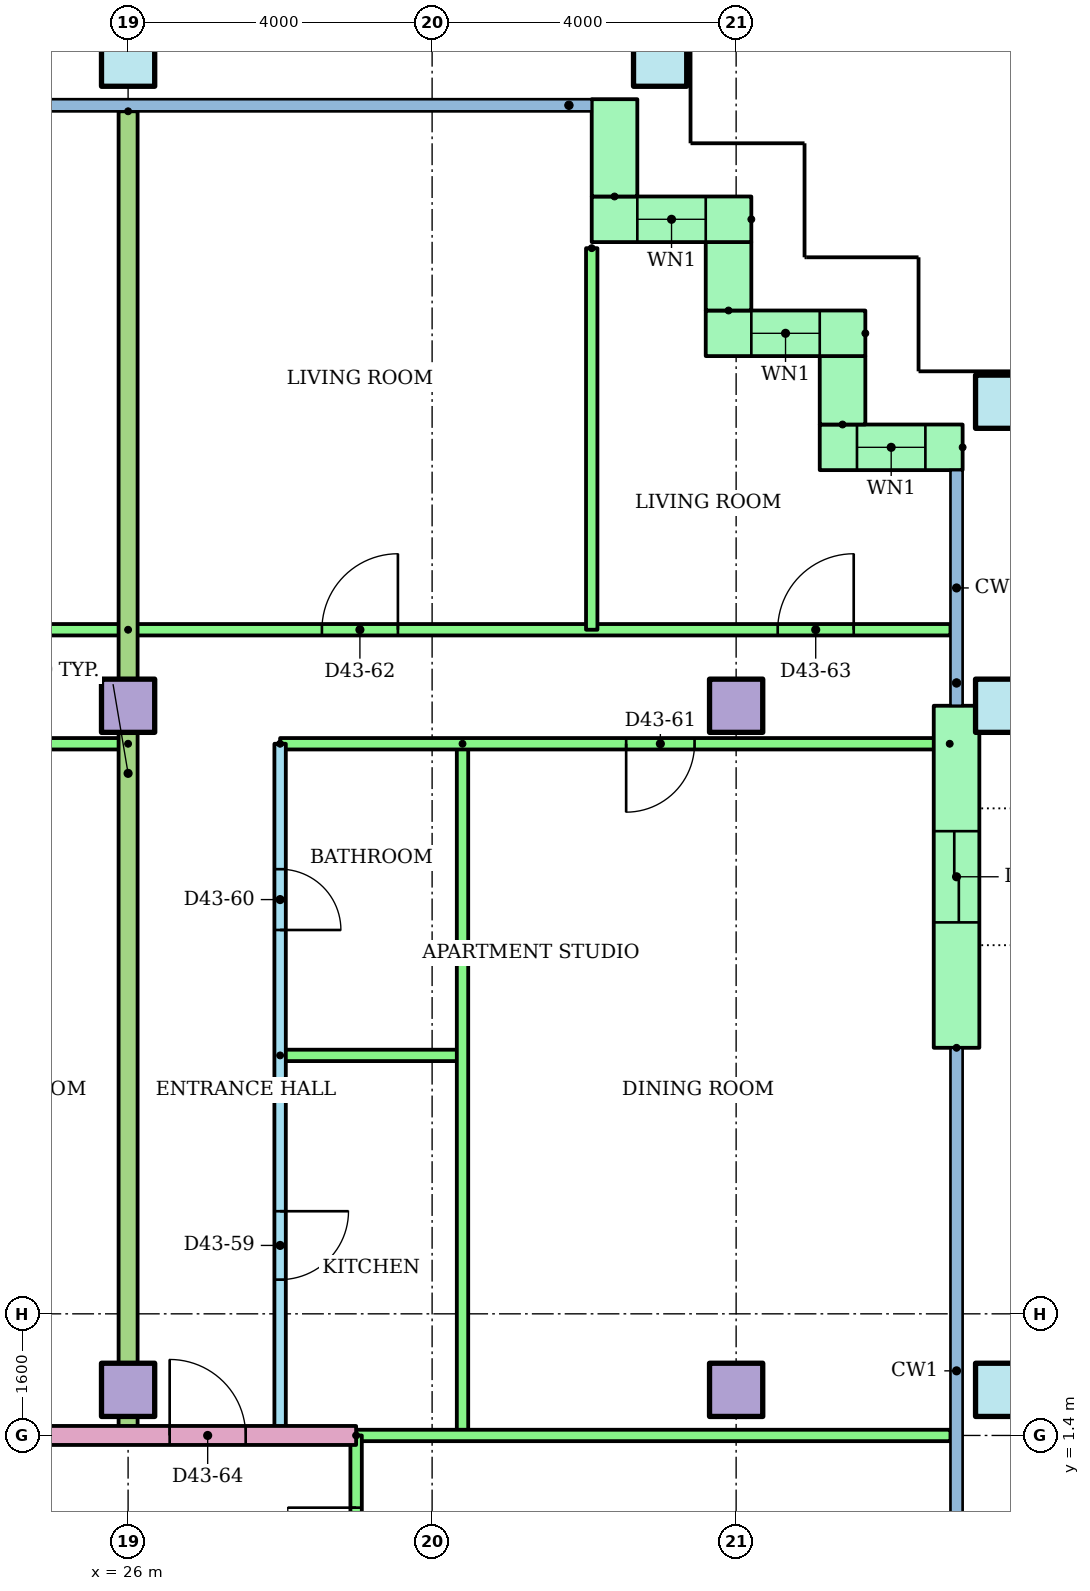
"""IFC4 building model, lengths in metres.
Left out: names, types, materials, properties, quantities, classifications, styles, units other than length and angle.
Written with IfcOpenShell. Run it as: python <this file> out.ifc"""

import sys

from ifc_helpers import new_model, si_unit, direction, frame, frame_2d, origin, origin_2d, place, context, subcontext, project, spatial, rectangle, hollow_rectangle, extrude, element, fill, save


model = new_model("IFC4")
c1 = context("Model", 3, precision=1e-05, world=origin(), true_north=direction((0.0, 1.0)))
c2 = subcontext(c1, "Body", "Model", "MODEL_VIEW")
j1 = project(units=[si_unit("LENGTHUNIT", "METRE"), si_unit("PLANEANGLEUNIT", "RADIAN")], contexts=[c1])
p1 = place(None, origin())
s1 = spatial("IfcSite", under=j1, at=p1, CompositionType="ELEMENT")
p2 = place(p1, origin())
s2 = spatial("IfcBuilding", under=s1, at=p2, CompositionType="ELEMENT")
p3 = place(p2, frame((0.0, 0.0, 168.5)))
s3 = spatial("IfcBuildingStorey", under=s2, at=p3, CompositionType="ELEMENT", Elevation=168.5)
for number, where in (
    (1, (26.0, 2.0, 0.0)),
    (2, (34.0, 2.0, 0.0)),
):
    element("IfcColumn", number, at=place(p3, frame(where)), inside=s3, PredefinedType="COLUMN", context=c2, shape_type="SweptSolid", body=[
        extrude(rectangle(XDim=0.7, YDim=0.7, at=origin_2d()), origin(), (0.0, 0.0, 1.0), 3.2),
    ])
p4 = place(p3, frame((37.5, 2.0, 0.0)))
e3 = element("IfcColumn", 3, at=p4, inside=s3, PredefinedType="COLUMN", context=c2, shape_type="SweptSolid", body=[
    extrude(hollow_rectangle(XDim=0.7, YDim=0.7, WallThickness=0.036, at=origin_2d()), origin(), (0.0, 0.0, 1.0), 3.2),
])
for number, where in (
    (4, (26.0, 11.0, 0.0)),
    (5, (34.0, 11.0, 0.0)),
):
    element("IfcColumn", number, at=place(p3, frame(where)), inside=s3, PredefinedType="COLUMN", context=c2, shape_type="SweptSolid", body=[
        extrude(rectangle(XDim=0.7, YDim=0.7, at=origin_2d()), origin(), (0.0, 0.0, 1.0), 3.2),
    ])
for number, where in (
    (6, (37.5, 11.0, 0.0)),
    (7, (37.5, 15.0, 0.0)),
    (8, (26.0, 19.5, 0.0)),
    (9, (33.0, 19.5, 0.0)),
):
    element("IfcColumn", number, at=place(p3, frame(where)), inside=s3, PredefinedType="COLUMN", context=c2, shape_type="SweptSolid", body=[
        extrude(hollow_rectangle(XDim=0.7, YDim=0.7, WallThickness=0.036, at=origin_2d()), origin(), (0.0, 0.0, 1.0), 3.2),
    ])
p5 = place(p3, frame((36.98, 14.4, 0.0), z_axis=(0.0, 0.0, 1.0), x_axis=(-1.0, 0.0, 0.0)))
e10 = element("IfcWall", 10, at=p5, inside=s3, PredefinedType="STANDARD", context=c2, shape_type="SweptSolid", body=[
    extrude(rectangle(XDim=1.88, YDim=0.6, at=frame_2d((0.94, 0.0))), origin(), (0.0, 0.0, 1.0), 2.92),
])
p6 = place(p5, frame((0.49, 0.0, 0.9)))
e11 = element("IfcOpeningElement", 11, at=p6, cuts=e10, PredefinedType="OPENING", context=c2, shape_type="SweptSolid", body=[
    extrude(rectangle(XDim=0.9, YDim=1.5, at=frame_2d((0.45, 0.75))), frame((0.0, 0.31, 0.0), z_axis=(0.0, -1.0, 0.0), x_axis=(1.0, 0.0, 0.0)), (0.0, 0.0, 1.0), 0.62),
])
p7 = place(p3, frame((35.4, 14.7, 0.0), z_axis=(0.0, 0.0, 1.0), x_axis=(0.0, 1.0, 0.0)))
e12 = element("IfcWall", 12, at=p7, inside=s3, PredefinedType="STANDARD", context=c2, shape_type="SweptSolid", body=[
    extrude(rectangle(XDim=0.9, YDim=0.6, at=frame_2d((0.45, 0.0))), origin(), (0.0, 0.0, 1.0), 2.92),
])
p8 = place(p3, frame((35.7, 15.9, 0.0), z_axis=(0.0, 0.0, 1.0), x_axis=(-1.0, 0.0, 0.0)))
e13 = element("IfcWall", 13, at=p8, inside=s3, PredefinedType="STANDARD", context=c2, shape_type="SweptSolid", body=[
    extrude(rectangle(XDim=2.1, YDim=0.6, at=frame_2d((1.05, 0.0))), origin(), (0.0, 0.0, 1.0), 2.92),
])
p9 = place(p8, frame((0.6, 0.0, 0.9)))
e14 = element("IfcOpeningElement", 14, at=p9, cuts=e13, PredefinedType="OPENING", context=c2, shape_type="SweptSolid", body=[
    extrude(rectangle(XDim=0.9, YDim=1.5, at=frame_2d((0.45, 0.75))), frame((0.0, 0.31, 0.0), z_axis=(0.0, -1.0, 0.0), x_axis=(1.0, 0.0, 0.0)), (0.0, 0.0, 1.0), 0.62),
])
p10 = place(p3, frame((33.9, 16.2, 0.0), z_axis=(0.0, 0.0, 1.0), x_axis=(0.0, 1.0, 0.0)))
e15 = element("IfcWall", 15, at=p10, inside=s3, PredefinedType="STANDARD", context=c2, shape_type="SweptSolid", body=[
    extrude(rectangle(XDim=0.9, YDim=0.6, at=frame_2d((0.45, 0.0))), origin(), (0.0, 0.0, 1.0), 2.92),
])
p11 = place(p3, frame((34.2, 17.4, 0.0), z_axis=(0.0, 0.0, 1.0), x_axis=(-1.0, 0.0, 0.0)))
e16 = element("IfcWall", 16, at=p11, inside=s3, PredefinedType="STANDARD", context=c2, shape_type="SweptSolid", body=[
    extrude(rectangle(XDim=2.1, YDim=0.6, at=frame_2d((1.05, 0.0))), origin(), (0.0, 0.0, 1.0), 2.92),
])
p12 = place(p11, frame((0.6, 0.0, 0.9)))
e17 = element("IfcOpeningElement", 17, at=p12, cuts=e16, PredefinedType="OPENING", context=c2, shape_type="SweptSolid", body=[
    extrude(rectangle(XDim=0.9, YDim=1.5, at=frame_2d((0.45, 0.75))), frame((0.0, 0.31, 0.0), z_axis=(0.0, -1.0, 0.0), x_axis=(1.0, 0.0, 0.0)), (0.0, 0.0, 1.0), 0.62),
])
p13 = place(p3, frame((32.4, 17.7, 0.0), z_axis=(0.0, 0.0, 1.0), x_axis=(0.0, 1.0, 0.0)))
e18 = element("IfcWall", 18, at=p13, inside=s3, PredefinedType="STANDARD", context=c2, shape_type="SweptSolid", body=[
    extrude(rectangle(XDim=1.28, YDim=0.6, at=frame_2d((0.64, 0.0))), origin(), (0.0, 0.0, 1.0), 2.92),
])
p14 = place(p3, frame((36.9, 6.5, 0.0), z_axis=(0.0, 0.0, 1.0), x_axis=(0.0, 1.0, 0.0)))
e19 = element("IfcWall", 19, at=p14, inside=s3, PredefinedType="STANDARD", context=c2, shape_type="SweptSolid", body=[
    extrude(rectangle(XDim=4.5, YDim=0.6, at=frame_2d((2.25, 0.0))), origin(), (0.0, 0.0, 1.0), 2.92),
])
p15 = place(p14, frame((1.65, 0.0, 0.0)))
e20 = element("IfcOpeningElement", 20, at=p15, cuts=e19, PredefinedType="OPENING", context=c2, shape_type="SweptSolid", body=[
    extrude(rectangle(XDim=1.2, YDim=2.1, at=frame_2d((0.6, 1.05))), frame((0.0, 0.31, 0.0), z_axis=(0.0, -1.0, 0.0), x_axis=(1.0, 0.0, 0.0)), (0.0, 0.0, 1.0), 0.62),
])
p16 = place(p3, frame((26.0, 10.5, 0.0), z_axis=(0.0, 0.0, 1.0), x_axis=(-1.0, 0.0, 0.0)))
e21 = element("IfcWall", 21, at=p16, inside=s3, PredefinedType="PARTITIONING", context=c2, shape_type="SweptSolid", body=[
    extrude(rectangle(XDim=10.0, YDim=0.15, at=frame_2d((5.0, 0.0))), origin(), (0.0, 0.0, 1.0), 2.4),
])
p17 = place(p16, frame((4.9, 0.0, 0.0)))
e22 = element("IfcOpeningElement", 22, at=p17, cuts=e21, PredefinedType="OPENING", context=c2, shape_type="SweptSolid", body=[
    extrude(rectangle(XDim=0.9, YDim=2.1, at=frame_2d((0.45, 1.05))), frame((0.0, 0.085, 0.0), z_axis=(0.0, -1.0, 0.0), x_axis=(1.0, 0.0, 0.0)), (0.0, 0.0, 1.0), 0.17),
])
p18 = place(p16, frame((1.1, 0.0, 0.0)))
e23 = element("IfcOpeningElement", 23, at=p18, cuts=e21, PredefinedType="OPENING", context=c2, shape_type="SweptSolid", body=[
    extrude(rectangle(XDim=0.9, YDim=2.1, at=frame_2d((0.45, 1.05))), frame((0.0, 0.085, 0.0), z_axis=(0.0, -1.0, 0.0), x_axis=(1.0, 0.0, 0.0)), (0.0, 0.0, 1.0), 0.17),
])
p19 = place(p3, frame((14.0, 12.0, 0.0)))
e24 = element("IfcWall", 24, at=p19, inside=s3, PredefinedType="PARTITIONING", context=c2, shape_type="SweptSolid", body=[
    extrude(rectangle(XDim=12.0, YDim=0.15, at=frame_2d((6.0, 0.0))), origin(), (0.0, 0.0, 1.0), 2.4),
])
p20 = place(p19, frame((1.5, 0.0, 0.0)))
e25 = element("IfcOpeningElement", 25, at=p20, cuts=e24, PredefinedType="OPENING", context=c2, shape_type="SweptSolid", body=[
    extrude(rectangle(XDim=1.0, YDim=2.1, at=frame_2d((0.5, 1.05))), frame((0.0, 0.085, 0.0), z_axis=(0.0, -1.0, 0.0), x_axis=(1.0, 0.0, 0.0)), (0.0, 0.0, 1.0), 0.17),
])
p21 = place(p19, frame((7.55, 0.0, 0.0)))
e26 = element("IfcOpeningElement", 26, at=p21, cuts=e24, PredefinedType="OPENING", context=c2, shape_type="SweptSolid", body=[
    extrude(rectangle(XDim=0.9, YDim=2.1, at=frame_2d((0.45, 1.05))), frame((0.0, 0.085, 0.0), z_axis=(0.0, -1.0, 0.0), x_axis=(1.0, 0.0, 0.0)), (0.0, 0.0, 1.0), 0.17),
])
p22 = place(p3, frame((28.0, 10.5, 0.0), z_axis=(0.0, 0.0, 1.0), x_axis=(0.0, -1.0, 0.0)))
e27 = element("IfcWall", 27, at=p22, inside=s3, PredefinedType="PARTITIONING", context=c2, shape_type="SweptSolid", body=[
    extrude(rectangle(XDim=9.1, YDim=0.15, at=frame_2d((4.55, 0.0))), origin(), (0.0, 0.0, 1.0), 2.4),
])
p23 = place(p22, frame((6.15, 0.0, 0.0)))
e28 = element("IfcOpeningElement", 28, at=p23, cuts=e27, PredefinedType="OPENING", context=c2, shape_type="SweptSolid", body=[
    extrude(rectangle(XDim=0.9, YDim=2.1, at=frame_2d((0.45, 1.05))), frame((0.0, 0.085, 0.0), z_axis=(0.0, -1.0, 0.0), x_axis=(1.0, 0.0, 0.0)), (0.0, 0.0, 1.0), 0.17),
])
p24 = place(p22, frame((1.65, 0.0, 0.0)))
e29 = element("IfcOpeningElement", 29, at=p24, cuts=e27, PredefinedType="OPENING", context=c2, shape_type="SweptSolid", body=[
    extrude(rectangle(XDim=0.8, YDim=2.1, at=frame_2d((0.4, 1.05))), frame((0.0, 0.085, 0.0), z_axis=(0.0, -1.0, 0.0), x_axis=(1.0, 0.0, 0.0)), (0.0, 0.0, 1.0), 0.17),
])
p25 = place(p3, frame((28.0, 6.4, 0.0)))
e30 = element("IfcWall", 30, at=p25, inside=s3, PredefinedType="PARTITIONING", context=c2, shape_type="SweptSolid", body=[
    extrude(rectangle(XDim=2.4, YDim=0.15, at=frame_2d((1.2, 0.0))), origin(), (0.0, 0.0, 1.0), 2.4),
])
p26 = place(p3, frame((30.4, 10.5, 0.0), z_axis=(0.0, 0.0, 1.0), x_axis=(0.0, -1.0, 0.0)))
e31 = element("IfcWall", 31, at=p26, inside=s3, PredefinedType="PARTITIONING", context=c2, shape_type="SweptSolid", body=[
    extrude(rectangle(XDim=9.1, YDim=0.15, at=frame_2d((4.55, 0.0))), origin(), (0.0, 0.0, 1.0), 2.4),
])
p27 = place(p3, frame((36.81, 10.5, 0.0), z_axis=(0.0, 0.0, 1.0), x_axis=(-1.0, 0.0, 0.0)))
e32 = element("IfcWall", 32, at=p27, inside=s3, PredefinedType="PARTITIONING", context=c2, shape_type="SweptSolid", body=[
    extrude(rectangle(XDim=8.81, YDim=0.15, at=frame_2d((4.405, 0.0))), origin(), (0.0, 0.0, 1.0), 2.4),
])
p28 = place(p27, frame((3.357, 0.0, 0.0)))
e33 = element("IfcOpeningElement", 33, at=p28, cuts=e32, PredefinedType="OPENING", context=c2, shape_type="SweptSolid", body=[
    extrude(rectangle(XDim=0.9, YDim=2.1, at=frame_2d((0.45, 1.05))), frame((0.0, 0.085, 0.0), z_axis=(0.0, -1.0, 0.0), x_axis=(1.0, 0.0, 0.0)), (0.0, 0.0, 1.0), 0.17),
])
p29 = place(p3, frame((26.0, 12.0, 0.0)))
e34 = element("IfcWall", 34, at=p29, inside=s3, PredefinedType="PARTITIONING", context=c2, shape_type="SweptSolid", body=[
    extrude(rectangle(XDim=10.82, YDim=0.15, at=frame_2d((5.41, 0.0))), origin(), (0.0, 0.0, 1.0), 2.4),
])
p30 = place(p29, frame((2.55, 0.0, 0.0)))
e35 = element("IfcOpeningElement", 35, at=p30, cuts=e34, PredefinedType="OPENING", context=c2, shape_type="SweptSolid", body=[
    extrude(rectangle(XDim=1.0, YDim=2.1, at=frame_2d((0.5, 1.05))), frame((0.0, 0.085, 0.0), z_axis=(0.0, -1.0, 0.0), x_axis=(1.0, 0.0, 0.0)), (0.0, 0.0, 1.0), 0.17),
])
p31 = place(p29, frame((8.547, 0.0, 0.0)))
e36 = element("IfcOpeningElement", 36, at=p31, cuts=e34, PredefinedType="OPENING", context=c2, shape_type="SweptSolid", body=[
    extrude(rectangle(XDim=1.0, YDim=2.1, at=frame_2d((0.5, 1.05))), frame((0.0, 0.085, 0.0), z_axis=(0.0, -1.0, 0.0), x_axis=(1.0, 0.0, 0.0)), (0.0, 0.0, 1.0), 0.17),
])
p32 = place(p3, frame((32.1, 17.02, 0.0), z_axis=(0.0, 0.0, 1.0), x_axis=(0.0, -1.0, 0.0)))
e37 = element("IfcWall", 37, at=p32, inside=s3, PredefinedType="PARTITIONING", context=c2, shape_type="SweptSolid", body=[
    extrude(rectangle(XDim=5.02, YDim=0.15, at=frame_2d((2.51, 0.0))), origin(), (0.0, 0.0, 1.0), 2.4),
])
p33 = place(p3, frame((26.0, 18.821, 0.0), z_axis=(0.0, 0.0, 1.0), x_axis=(0.0, -1.0, 0.0)))
e38 = element("IfcWall", 38, at=p33, inside=s3, PredefinedType="PARTITIONING", context=c2, shape_type="SweptSolid", body=[
    extrude(rectangle(XDim=17.421, YDim=0.25, at=frame_2d((8.71, 0.0))), origin(), (0.0, 0.0, 1.0), 2.4),
])
p34 = place(p3, frame((14.0, 1.4, 0.0)))
e39 = element("IfcWall", 39, at=p34, inside=s3, PredefinedType="PARTITIONING", context=c2, shape_type="SweptSolid", body=[
    extrude(rectangle(XDim=15.0, YDim=0.25, at=frame_2d((7.5, 0.0))), origin(), (0.0, 0.0, 1.0), 2.4),
])
p35 = place(p34, frame((0.5, 0.0, 0.0)))
e40 = element("IfcOpeningElement", 40, at=p35, cuts=e39, PredefinedType="OPENING", context=c2, shape_type="SweptSolid", body=[
    extrude(rectangle(XDim=1.0, YDim=2.1, at=frame_2d((0.5, 1.05))), frame((0.0, 0.135, 0.0), z_axis=(0.0, -1.0, 0.0), x_axis=(1.0, 0.0, 0.0)), (0.0, 0.0, 1.0), 0.27),
])
p36 = place(p34, frame((12.547, 0.0, 0.0)))
e41 = element("IfcOpeningElement", 41, at=p36, cuts=e39, PredefinedType="OPENING", context=c2, shape_type="SweptSolid", body=[
    extrude(rectangle(XDim=1.0, YDim=2.1, at=frame_2d((0.5, 1.05))), frame((0.0, 0.135, 0.0), z_axis=(0.0, -1.0, 0.0), x_axis=(1.0, 0.0, 0.0)), (0.0, 0.0, 1.0), 0.27),
])
p37 = place(p3, frame((29.0, 1.4, 0.0)))
e42 = element("IfcWall", 42, at=p37, inside=s3, PredefinedType="PARTITIONING", context=c2, shape_type="SweptSolid", body=[
    extrude(rectangle(XDim=7.82, YDim=0.15, at=frame_2d((3.91, 0.0))), origin(), (0.0, 0.0, 1.0), 2.4),
])
p38 = place(p3, frame((29.0, -1.4, 0.0), z_axis=(0.0, 0.0, 1.0), x_axis=(0.0, 1.0, 0.0)))
e43 = element("IfcWall", 43, at=p38, inside=s3, PredefinedType="PARTITIONING", context=c2, shape_type="SweptSolid", body=[
    extrude(rectangle(XDim=2.8, YDim=0.15, at=frame_2d((1.4, 0.0))), origin(), (0.0, 0.0, 1.0), 2.4),
])
p39 = place(p38, frame((0.95, 0.0, 0.0)))
e44 = element("IfcOpeningElement", 44, at=p39, cuts=e43, PredefinedType="OPENING", context=c2, shape_type="SweptSolid", body=[
    extrude(rectangle(XDim=0.9, YDim=2.1, at=frame_2d((0.45, 1.05))), frame((0.0, 0.085, 0.0), z_axis=(0.0, -1.0, 0.0), x_axis=(1.0, 0.0, 0.0)), (0.0, 0.0, 1.0), 0.17),
])
p40 = place(p6, origin())
e45 = element("IfcWindow", 45, at=p40, inside=s3, PartitioningType="SINGLE_PANEL", PredefinedType="WINDOW", context=c2, shape_type="SweptSolid", body=[
    extrude(rectangle(XDim=0.9, YDim=1.5, at=frame_2d((0.45, 0.75))), frame((0.0, 0.03, 0.0), z_axis=(0.0, -1.0, 0.0), x_axis=(1.0, 0.0, 0.0)), (0.0, 0.0, 1.0), 0.06),
])
fill(e11, e45)
p41 = place(p9, origin())
e46 = element("IfcWindow", 46, at=p41, inside=s3, PartitioningType="SINGLE_PANEL", PredefinedType="WINDOW", context=c2, shape_type="SweptSolid", body=[
    extrude(rectangle(XDim=0.9, YDim=1.5, at=frame_2d((0.45, 0.75))), frame((0.0, 0.03, 0.0), z_axis=(0.0, -1.0, 0.0), x_axis=(1.0, 0.0, 0.0)), (0.0, 0.0, 1.0), 0.06),
])
fill(e14, e46)
p42 = place(p12, origin())
e47 = element("IfcWindow", 47, at=p42, inside=s3, PartitioningType="SINGLE_PANEL", PredefinedType="WINDOW", context=c2, shape_type="SweptSolid", body=[
    extrude(rectangle(XDim=0.9, YDim=1.5, at=frame_2d((0.45, 0.75))), frame((0.0, 0.03, 0.0), z_axis=(0.0, -1.0, 0.0), x_axis=(1.0, 0.0, 0.0)), (0.0, 0.0, 1.0), 0.06),
])
fill(e17, e47)
p43 = place(p23, origin())
e48 = element("IfcDoor", 48, at=p43, inside=s3, OperationType="SINGLE_SWING_LEFT", PredefinedType="DOOR", context=c2, shape_type="SweptSolid", body=[
    extrude(rectangle(XDim=0.9, YDim=2.1, at=frame_2d((0.45, 1.05))), frame((0.0, 0.025, 0.0), z_axis=(0.0, -1.0, 0.0), x_axis=(1.0, 0.0, 0.0)), (0.0, 0.0, 1.0), 0.05),
])
fill(e28, e48)
p44 = place(p24, origin())
e49 = element("IfcDoor", 49, at=p44, inside=s3, OperationType="SINGLE_SWING_RIGHT", PredefinedType="DOOR", context=c2, shape_type="SweptSolid", body=[
    extrude(rectangle(XDim=0.8, YDim=2.1, at=frame_2d((0.4, 1.05))), frame((0.0, 0.025, 0.0), z_axis=(0.0, -1.0, 0.0), x_axis=(1.0, 0.0, 0.0)), (0.0, 0.0, 1.0), 0.05),
])
fill(e29, e49)
p45 = place(p28, origin())
e50 = element("IfcDoor", 50, at=p45, inside=s3, OperationType="SINGLE_SWING_RIGHT", PredefinedType="DOOR", context=c2, shape_type="SweptSolid", body=[
    extrude(rectangle(XDim=0.9, YDim=2.1, at=frame_2d((0.45, 1.05))), frame((0.0, 0.025, 0.0), z_axis=(0.0, -1.0, 0.0), x_axis=(1.0, 0.0, 0.0)), (0.0, 0.0, 1.0), 0.05),
])
fill(e33, e50)
p46 = place(p30, origin())
e51 = element("IfcDoor", 51, at=p46, inside=s3, OperationType="SINGLE_SWING_RIGHT", PredefinedType="DOOR", context=c2, shape_type="SweptSolid", body=[
    extrude(rectangle(XDim=1.0, YDim=2.1, at=frame_2d((0.5, 1.05))), frame((0.0, 0.025, 0.0), z_axis=(0.0, -1.0, 0.0), x_axis=(1.0, 0.0, 0.0)), (0.0, 0.0, 1.0), 0.05),
])
fill(e35, e51)
p47 = place(p31, origin())
e52 = element("IfcDoor", 52, at=p47, inside=s3, OperationType="SINGLE_SWING_RIGHT", PredefinedType="DOOR", context=c2, shape_type="SweptSolid", body=[
    extrude(rectangle(XDim=1.0, YDim=2.1, at=frame_2d((0.5, 1.05))), frame((0.0, 0.025, 0.0), z_axis=(0.0, -1.0, 0.0), x_axis=(1.0, 0.0, 0.0)), (0.0, 0.0, 1.0), 0.05),
])
fill(e36, e52)
p48 = place(p36, origin())
e53 = element("IfcDoor", 53, at=p48, inside=s3, OperationType="SINGLE_SWING_LEFT", PredefinedType="DOOR", context=c2, shape_type="SweptSolid", body=[
    extrude(rectangle(XDim=1.0, YDim=2.1, at=frame_2d((0.5, 1.05))), frame((0.0, 0.025, 0.0), z_axis=(0.0, -1.0, 0.0), x_axis=(1.0, 0.0, 0.0)), (0.0, 0.0, 1.0), 0.05),
])
fill(e41, e53)
p49 = place(p39, origin())
e54 = element("IfcDoor", 54, at=p49, inside=s3, OperationType="SINGLE_SWING_RIGHT", PredefinedType="DOOR", context=c2, shape_type="SweptSolid", body=[
    extrude(rectangle(XDim=0.9, YDim=2.1, at=frame_2d((0.45, 1.05))), frame((0.0, 0.025, 0.0), z_axis=(0.0, -1.0, 0.0), x_axis=(1.0, 0.0, 0.0)), (0.0, 0.0, 1.0), 0.05),
])
fill(e44, e54)
p50 = place(p15, origin())
e55 = element("IfcDoor", 55, at=p50, inside=s3, OperationType="SLIDING_TO_LEFT", PredefinedType="DOOR", context=c2, shape_type="SweptSolid", body=[
    extrude(rectangle(XDim=1.2, YDim=2.1, at=frame_2d((0.6, 1.05))), frame((0.0, 0.025, 0.0), z_axis=(0.0, -1.0, 0.0), x_axis=(1.0, 0.0, 0.0)), (0.0, 0.0, 1.0), 0.05),
])
fill(e20, e55)
save(model, sys.argv[1])
